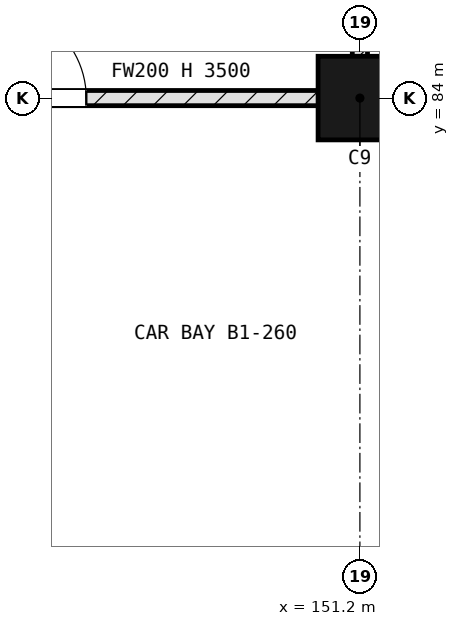
"""IFC4 building model, lengths in metres.
Left out: names, types, materials, properties, quantities, classifications, styles, units other than length and angle.
Written with IfcOpenShell. Run it as: python <this file> out.ifc"""

import sys

from ifc_helpers import new_model, si_unit, direction, frame, frame_2d, origin, origin_2d, place, context, subcontext, project, spatial, rectangle, extrude, element, fill, save


model = new_model("IFC4")
c1 = context("Model", 3, precision=1e-05, world=origin(), true_north=direction((0.0, 1.0)))
c2 = subcontext(c1, "Body", "Model", "MODEL_VIEW")
j1 = project(units=[si_unit("LENGTHUNIT", "METRE"), si_unit("PLANEANGLEUNIT", "RADIAN")], contexts=[c1])
p1 = place(None, origin())
s1 = spatial("IfcSite", under=j1, at=p1, CompositionType="ELEMENT")
p2 = place(p1, origin())
s2 = spatial("IfcBuilding", under=s1, at=p2, CompositionType="ELEMENT")
p3 = place(p2, frame((0.0, 0.0, -4.8)))
s3 = spatial("IfcBuildingStorey", under=s2, at=p3, CompositionType="ELEMENT", Elevation=-4.8)
p4 = place(p3, frame((151.2, 84.0, -0.3), z_axis=(0.0, 0.0, 1.0), x_axis=(1.0, 0.0, 0.0)))
e1 = element("IfcColumn", 1, at=p4, inside=s3, PredefinedType="COLUMN", context=c2, shape_type="SweptSolid", body=[
    extrude(rectangle(XDim=1.1, YDim=1.1, at=origin_2d()), origin(), (0.0, 0.0, 1.0), 4.8),
])
p5 = place(p3, frame((143.0, 84.0, 0.0), z_axis=(0.0, 0.0, 1.0), x_axis=(1.0, 0.0, 0.0)))
e2 = element("IfcWall", 2, at=p5, inside=s3, PredefinedType="SOLIDWALL", context=c2, shape_type="SweptSolid", body=[
    extrude(rectangle(XDim=16.7, YDim=0.2, at=frame_2d((8.35, 0.0))), origin(), (0.0, 0.0, 1.0), 3.5),
])
p6 = place(p5, frame((3.4, 0.0, 0.0)))
e3 = element("IfcOpeningElement", 3, at=p6, cuts=e2, PredefinedType="OPENING", context=c2, shape_type="SweptSolid", body=[
    extrude(rectangle(XDim=1.2, YDim=2.4, at=frame_2d((0.6, 1.2))), frame((0.0, 0.11, 0.0), z_axis=(0.0, -1.0, 0.0), x_axis=(1.0, 0.0, 0.0)), (0.0, 0.0, 1.0), 0.22),
])
p7 = place(p5, frame((10.5, 0.0, 0.0)))
e4 = element("IfcOpeningElement", 4, at=p7, cuts=e2, PredefinedType="OPENING", context=c2, shape_type="SweptSolid", body=[
    extrude(rectangle(XDim=1.2, YDim=2.4, at=frame_2d((0.6, 1.2))), frame((0.0, 0.11, 0.0), z_axis=(0.0, -1.0, 0.0), x_axis=(1.0, 0.0, 0.0)), (0.0, 0.0, 1.0), 0.22),
])
p8 = place(p5, frame((14.8, 0.0, 0.0)))
e5 = element("IfcOpeningElement", 5, at=p8, cuts=e2, PredefinedType="OPENING", context=c2, shape_type="SweptSolid", body=[
    extrude(rectangle(XDim=1.0, YDim=2.1, at=frame_2d((0.5, 1.05))), frame((0.0, 0.11, 0.0), z_axis=(0.0, -1.0, 0.0), x_axis=(1.0, 0.0, 0.0)), (0.0, 0.0, 1.0), 0.22),
])
p9 = place(p3, frame((151.2, 84.1, 0.0), z_axis=(0.0, 0.0, 1.0), x_axis=(0.0, 1.0, 0.0)))
e6 = element("IfcWall", 6, at=p9, inside=s3, PredefinedType="SOLIDWALL", context=c2, shape_type="SweptSolid", body=[
    extrude(rectangle(XDim=8.05, YDim=0.2, at=frame_2d((4.025, 0.0))), origin(), (0.0, 0.0, 1.0), 3.6),
])
p10 = place(p6, origin())
e7 = element("IfcDoor", 7, at=p10, inside=s3, OperationType="SINGLE_SWING_RIGHT", PredefinedType="DOOR", context=c2, shape_type="SweptSolid", body=[
    extrude(rectangle(XDim=1.2, YDim=2.4, at=frame_2d((0.6, 1.2))), frame((0.0, 0.025, 0.0), z_axis=(0.0, -1.0, 0.0), x_axis=(1.0, 0.0, 0.0)), (0.0, 0.0, 1.0), 0.05),
])
fill(e3, e7)
save(model, sys.argv[1])
